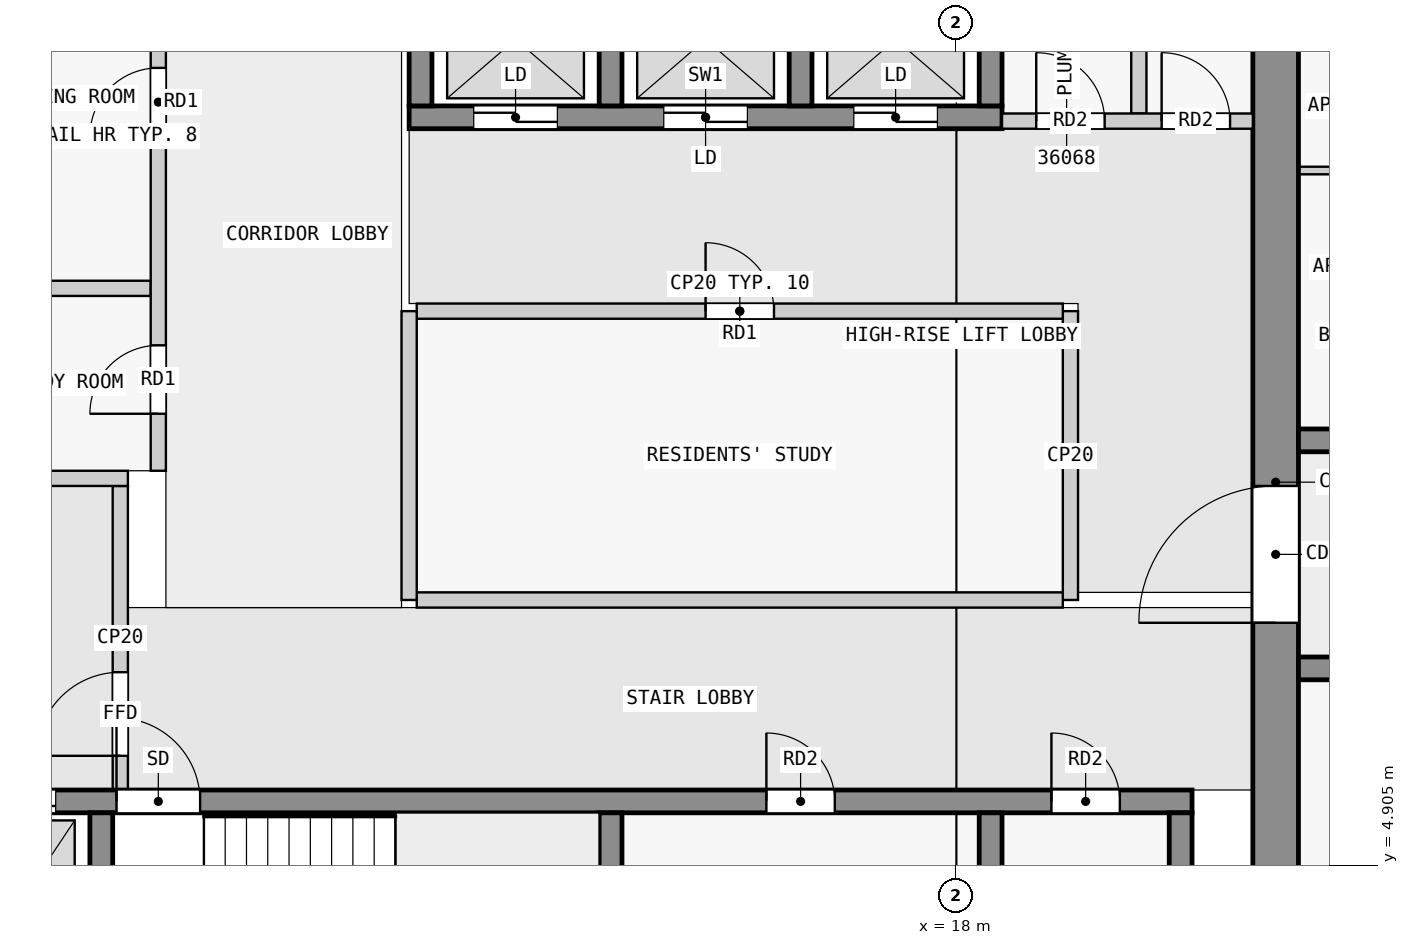
"""IFC4 building model, lengths in metres.
Left out: names, types, materials, properties, quantities, classifications, styles, units other than length and angle.
Written with IfcOpenShell. Run it as: python <this file> out.ifc"""

import sys

from ifc_helpers import new_model, si_unit, direction, frame, frame_2d, origin, place, context, subcontext, project, spatial, rectangle, extrude, element, fill, save


model = new_model("IFC4")
c1 = context("Model", 3, precision=1e-05, world=origin(), true_north=direction((0.0, 1.0)))
c2 = subcontext(c1, "Body", "Model", "MODEL_VIEW")
j1 = project(units=[si_unit("LENGTHUNIT", "METRE"), si_unit("PLANEANGLEUNIT", "RADIAN")], contexts=[c1])
p1 = place(None, origin())
s1 = spatial("IfcSite", under=j1, at=p1, CompositionType="ELEMENT")
p2 = place(p1, origin())
s2 = spatial("IfcBuilding", under=s1, at=p2, CompositionType="ELEMENT")
p3 = place(p2, frame((0.0, 0.0, 142.9)))
s3 = spatial("IfcBuildingStorey", under=s2, at=p3, CompositionType="ELEMENT", Elevation=142.9)
p4 = place(p3, frame((22.2, 2.5, 0.0), z_axis=(0.0, 0.0, 1.0), x_axis=(0.0, 1.0, 0.0)))
e1 = element("IfcWall", 1, at=p4, inside=s3, PredefinedType="SHEAR", context=c2, shape_type="SweptSolid", body=[
    extrude(rectangle(XDim=14.9, YDim=0.6, at=frame_2d((7.45, 0.0))), origin(), (0.0, 0.0, 1.0), 3.25),
])
p5 = place(p4, frame((5.6, 0.0, 0.0)))
e2 = element("IfcOpeningElement", 2, at=p5, cuts=e1, PredefinedType="OPENING", context=c2, shape_type="SweptSolid", body=[
    extrude(rectangle(XDim=1.8, YDim=2.1, at=frame_2d((0.9, 1.05))), frame((0.0, 0.31, 0.0), z_axis=(0.0, -1.0, 0.0), x_axis=(1.0, 0.0, 0.0)), (0.0, 0.0, 1.0), 0.62),
])
for number, where, z_axis, x_axis in (
    (3, (6.75, 2.8, 0.0), (0.0, 0.0, 1.0), (0.0, 1.0, 0.0)),
    (4, (13.45, 2.8, 0.0), (0.0, 0.0, 1.0), (0.0, 1.0, 0.0)),
    (5, (18.45, 2.8, 0.0), (0.0, 0.0, 1.0), (0.0, 1.0, 0.0)),
    (6, (20.95, 2.8, 0.0), (0.0, 0.0, 1.0), (0.0, 1.0, 0.0)),
):
    element("IfcWall", number, at=place(p3, frame(where, z_axis=z_axis, x_axis=x_axis)), inside=s3, PredefinedType="SHEAR", context=c2, shape_type="SweptSolid", body=[
        extrude(rectangle(XDim=2.8, YDim=0.3, at=frame_2d((1.4, 0.0))), origin(), (0.0, 0.0, 1.0), 3.25),
    ])
p6 = place(p3, frame((2.3, 5.75, 0.0), z_axis=(0.0, 0.0, 1.0), x_axis=(1.0, 0.0, 0.0)))
e7 = element("IfcWall", 7, at=p6, inside=s3, PredefinedType="SHEAR", context=c2, shape_type="SweptSolid", body=[
    extrude(rectangle(XDim=18.8, YDim=0.3, at=frame_2d((9.4, 0.0))), origin(), (0.0, 0.0, 1.0), 3.25),
])
p7 = place(p6, frame((4.65, 0.0, 0.0)))
e8 = element("IfcOpeningElement", 8, at=p7, cuts=e7, PredefinedType="OPENING", context=c2, shape_type="SweptSolid", body=[
    extrude(rectangle(XDim=1.1, YDim=2.1, at=frame_2d((0.55, 1.05))), frame((0.0, 0.16, 0.0), z_axis=(0.0, -1.0, 0.0), x_axis=(1.0, 0.0, 0.0)), (0.0, 0.0, 1.0), 0.32),
])
p8 = place(p6, frame((0.45, 0.0, 0.0)))
e9 = element("IfcOpeningElement", 9, at=p8, cuts=e7, PredefinedType="OPENING", context=c2, shape_type="SweptSolid", body=[
    extrude(rectangle(XDim=1.1, YDim=2.1, at=frame_2d((0.55, 1.05))), frame((0.0, 0.16, 0.0), z_axis=(0.0, -1.0, 0.0), x_axis=(1.0, 0.0, 0.0)), (0.0, 0.0, 1.0), 0.32),
])
p9 = place(p6, frame((2.75, 0.0, 0.0)))
e10 = element("IfcOpeningElement", 10, at=p9, cuts=e7, PredefinedType="OPENING", context=c2, shape_type="SweptSolid", body=[
    extrude(rectangle(XDim=1.1, YDim=2.1, at=frame_2d((0.55, 1.05))), frame((0.0, 0.16, 0.0), z_axis=(0.0, -1.0, 0.0), x_axis=(1.0, 0.0, 0.0)), (0.0, 0.0, 1.0), 0.32),
])
p10 = place(p6, frame((13.2, 0.0, 0.0)))
e11 = element("IfcOpeningElement", 11, at=p10, cuts=e7, PredefinedType="OPENING", context=c2, shape_type="SweptSolid", body=[
    extrude(rectangle(XDim=0.9, YDim=2.1, at=frame_2d((0.45, 1.05))), frame((0.0, 0.16, 0.0), z_axis=(0.0, -1.0, 0.0), x_axis=(1.0, 0.0, 0.0)), (0.0, 0.0, 1.0), 0.32),
])
p11 = place(p6, frame((16.95, 0.0, 0.0)))
e12 = element("IfcOpeningElement", 12, at=p11, cuts=e7, PredefinedType="OPENING", context=c2, shape_type="SweptSolid", body=[
    extrude(rectangle(XDim=0.9, YDim=2.1, at=frame_2d((0.45, 1.05))), frame((0.0, 0.16, 0.0), z_axis=(0.0, -1.0, 0.0), x_axis=(1.0, 0.0, 0.0)), (0.0, 0.0, 1.0), 0.32),
])
p12 = place(p3, frame((10.8, 14.75, 0.0), z_axis=(0.0, 0.0, 1.0), x_axis=(1.0, 0.0, 0.0)))
e13 = element("IfcWall", 13, at=p12, inside=s3, PredefinedType="SHEAR", context=c2, shape_type="SweptSolid", body=[
    extrude(rectangle(XDim=7.8, YDim=0.3, at=frame_2d((3.9, 0.0))), origin(), (0.0, 0.0, 1.0), 3.25),
])
p13 = place(p12, frame((0.85, 0.0, 0.0)))
e14 = element("IfcOpeningElement", 14, at=p13, cuts=e13, PredefinedType="OPENING", context=c2, shape_type="SweptSolid", body=[
    extrude(rectangle(XDim=1.1, YDim=2.1, at=frame_2d((0.55, 1.05))), frame((0.0, 0.16, 0.0), z_axis=(0.0, -1.0, 0.0), x_axis=(1.0, 0.0, 0.0)), (0.0, 0.0, 1.0), 0.32),
])
p14 = place(p12, frame((3.35, 0.0, 0.0)))
e15 = element("IfcOpeningElement", 15, at=p14, cuts=e13, PredefinedType="OPENING", context=c2, shape_type="SweptSolid", body=[
    extrude(rectangle(XDim=1.1, YDim=2.1, at=frame_2d((0.55, 1.05))), frame((0.0, 0.16, 0.0), z_axis=(0.0, -1.0, 0.0), x_axis=(1.0, 0.0, 0.0)), (0.0, 0.0, 1.0), 0.32),
])
p15 = place(p12, frame((5.85, 0.0, 0.0)))
e16 = element("IfcOpeningElement", 16, at=p15, cuts=e13, PredefinedType="OPENING", context=c2, shape_type="SweptSolid", body=[
    extrude(rectangle(XDim=1.1, YDim=2.1, at=frame_2d((0.55, 1.05))), frame((0.0, 0.16, 0.0), z_axis=(0.0, -1.0, 0.0), x_axis=(1.0, 0.0, 0.0)), (0.0, 0.0, 1.0), 0.32),
])
for number, where, z_axis, x_axis in (
    (17, (10.95, 14.9, 0.0), (0.0, 0.0, 1.0), (0.0, 1.0, 0.0)),
    (18, (13.45, 14.9, 0.0), (0.0, 0.0, 1.0), (0.0, 1.0, 0.0)),
    (19, (15.95, 14.9, 0.0), (0.0, 0.0, 1.0), (0.0, 1.0, 0.0)),
    (20, (18.45, 14.9, 0.0), (0.0, 0.0, 1.0), (0.0, 1.0, 0.0)),
):
    element("IfcWall", number, at=place(p3, frame(where, z_axis=z_axis, x_axis=x_axis)), inside=s3, PredefinedType="SHEAR", context=c2, shape_type="SweptSolid", body=[
        extrude(rectangle(XDim=2.0, YDim=0.3, at=frame_2d((1.0, 0.0))), origin(), (0.0, 0.0, 1.0), 3.25),
    ])
p16 = place(p3, frame((22.5, 7.5, 0.0), z_axis=(0.0, 0.0, 1.0), x_axis=(1.0, 0.0, 0.0)))
e21 = element("IfcWall", 21, at=p16, inside=s3, PredefinedType="SHEAR", context=c2, shape_type="SweptSolid", body=[
    extrude(rectangle(XDim=22.5, YDim=0.3, at=frame_2d((11.25, 0.0))), origin(), (0.0, 0.0, 1.0), 3.25),
])
p17 = place(p16, frame((1.75, 0.0, 0.0)))
e22 = element("IfcOpeningElement", 22, at=p17, cuts=e21, PredefinedType="OPENING", context=c2, shape_type="SweptSolid", body=[
    extrude(rectangle(XDim=1.0, YDim=2.1, at=frame_2d((0.5, 1.05))), frame((0.0, 0.16, 0.0), z_axis=(0.0, -1.0, 0.0), x_axis=(1.0, 0.0, 0.0)), (0.0, 0.0, 1.0), 0.32),
])
p18 = place(p16, frame((6.25, 0.0, 0.0)))
e23 = element("IfcOpeningElement", 23, at=p18, cuts=e21, PredefinedType="OPENING", context=c2, shape_type="SweptSolid", body=[
    extrude(rectangle(XDim=1.0, YDim=2.1, at=frame_2d((0.5, 1.05))), frame((0.0, 0.16, 0.0), z_axis=(0.0, -1.0, 0.0), x_axis=(1.0, 0.0, 0.0)), (0.0, 0.0, 1.0), 0.32),
])
p19 = place(p16, frame((10.35, 0.0, 0.0)))
e24 = element("IfcOpeningElement", 24, at=p19, cuts=e21, PredefinedType="OPENING", context=c2, shape_type="SweptSolid", body=[
    extrude(rectangle(XDim=1.8, YDim=2.1, at=frame_2d((0.9, 1.05))), frame((0.0, 0.16, 0.0), z_axis=(0.0, -1.0, 0.0), x_axis=(1.0, 0.0, 0.0)), (0.0, 0.0, 1.0), 0.32),
])
p20 = place(p16, frame((16.85, 0.0, 0.0)))
e25 = element("IfcOpeningElement", 25, at=p20, cuts=e21, PredefinedType="OPENING", context=c2, shape_type="SweptSolid", body=[
    extrude(rectangle(XDim=1.0, YDim=2.1, at=frame_2d((0.5, 1.05))), frame((0.0, 0.16, 0.0), z_axis=(0.0, -1.0, 0.0), x_axis=(1.0, 0.0, 0.0)), (0.0, 0.0, 1.0), 0.32),
])
p21 = place(p3, frame((22.5, 10.5, 0.0), z_axis=(0.0, 0.0, 1.0), x_axis=(1.0, 0.0, 0.0)))
e26 = element("IfcWall", 26, at=p21, inside=s3, PredefinedType="SHEAR", context=c2, shape_type="SweptSolid", body=[
    extrude(rectangle(XDim=22.5, YDim=0.3, at=frame_2d((11.25, 0.0))), origin(), (0.0, 0.0, 1.0), 3.25),
])
p22 = place(p21, frame((4.05, 0.0, 0.0)))
e27 = element("IfcOpeningElement", 27, at=p22, cuts=e26, PredefinedType="OPENING", context=c2, shape_type="SweptSolid", body=[
    extrude(rectangle(XDim=1.0, YDim=2.1, at=frame_2d((0.5, 1.05))), frame((0.0, 0.16, 0.0), z_axis=(0.0, -1.0, 0.0), x_axis=(1.0, 0.0, 0.0)), (0.0, 0.0, 1.0), 0.32),
])
p23 = place(p21, frame((10.85, 0.0, 0.0)))
e28 = element("IfcOpeningElement", 28, at=p23, cuts=e26, PredefinedType="OPENING", context=c2, shape_type="SweptSolid", body=[
    extrude(rectangle(XDim=0.9, YDim=2.1, at=frame_2d((0.45, 1.05))), frame((0.0, 0.16, 0.0), z_axis=(0.0, -1.0, 0.0), x_axis=(1.0, 0.0, 0.0)), (0.0, 0.0, 1.0), 0.32),
])
p24 = place(p21, frame((15.25, 0.0, 0.0)))
e29 = element("IfcOpeningElement", 29, at=p24, cuts=e26, PredefinedType="OPENING", context=c2, shape_type="SweptSolid", body=[
    extrude(rectangle(XDim=1.0, YDim=2.1, at=frame_2d((0.5, 1.05))), frame((0.0, 0.16, 0.0), z_axis=(0.0, -1.0, 0.0), x_axis=(1.0, 0.0, 0.0)), (0.0, 0.0, 1.0), 0.32),
])
p25 = place(p21, frame((18.75, 0.0, 0.0)))
e30 = element("IfcOpeningElement", 30, at=p25, cuts=e26, PredefinedType="OPENING", context=c2, shape_type="SweptSolid", body=[
    extrude(rectangle(XDim=0.9, YDim=2.1, at=frame_2d((0.45, 1.05))), frame((0.0, 0.16, 0.0), z_axis=(0.0, -1.0, 0.0), x_axis=(1.0, 0.0, 0.0)), (0.0, 0.0, 1.0), 0.32),
])
p26 = place(p21, frame((20.95, 0.0, 0.0)))
e31 = element("IfcOpeningElement", 31, at=p26, cuts=e26, PredefinedType="OPENING", context=c2, shape_type="SweptSolid", body=[
    extrude(rectangle(XDim=1.0, YDim=2.1, at=frame_2d((0.5, 1.05))), frame((0.0, 0.16, 0.0), z_axis=(0.0, -1.0, 0.0), x_axis=(1.0, 0.0, 0.0)), (0.0, 0.0, 1.0), 0.32),
])
p27 = place(p3, frame((7.0, 5.9, 0.0), z_axis=(0.0, 0.0, 1.0), x_axis=(0.0, 1.0, 0.0)))
e32 = element("IfcWall", 32, at=p27, inside=s3, PredefinedType="PARTITIONING", context=c2, shape_type="SweptSolid", body=[
    extrude(rectangle(XDim=4.0, YDim=0.2, at=frame_2d((2.0, 0.0))), origin(), (0.0, 0.0, 1.0), 3.25),
])
p28 = place(p27, frame((0.45, 0.0, 0.0)))
e33 = element("IfcOpeningElement", 33, at=p28, cuts=e32, PredefinedType="OPENING", context=c2, shape_type="SweptSolid", body=[
    extrude(rectangle(XDim=1.1, YDim=2.1, at=frame_2d((0.55, 1.05))), frame((0.0, 0.11, 0.0), z_axis=(0.0, -1.0, 0.0), x_axis=(1.0, 0.0, 0.0)), (0.0, 0.0, 1.0), 0.22),
])
p29 = place(p3, frame((5.15, 10.0, 0.0), z_axis=(0.0, 0.0, 1.0), x_axis=(1.0, 0.0, 0.0)))
e34 = element("IfcWall", 34, at=p29, inside=s3, PredefinedType="PARTITIONING", context=c2, shape_type="SweptSolid", body=[
    extrude(rectangle(XDim=1.95, YDim=0.2, at=frame_2d((0.975, 0.0))), origin(), (0.0, 0.0, 1.0), 3.25),
])
p30 = place(p3, frame((10.8, 8.4, 0.0), z_axis=(0.0, 0.0, 1.0), x_axis=(0.0, 1.0, 0.0)))
e35 = element("IfcWall", 35, at=p30, inside=s3, PredefinedType="PARTITIONING", context=c2, shape_type="SweptSolid", body=[
    extrude(rectangle(XDim=3.8, YDim=0.2, at=frame_2d((1.9, 0.0))), origin(), (0.0, 0.0, 1.0), 3.25),
])
p31 = place(p3, frame((10.9, 8.4, 0.0), z_axis=(0.0, 0.0, 1.0), x_axis=(1.0, 0.0, 0.0)))
e36 = element("IfcWall", 36, at=p31, inside=s3, PredefinedType="PARTITIONING", context=c2, shape_type="SweptSolid", body=[
    extrude(rectangle(XDim=8.5, YDim=0.2, at=frame_2d((4.25, 0.0))), origin(), (0.0, 0.0, 1.0), 3.25),
])
p32 = place(p3, frame((19.5, 8.4, 0.0), z_axis=(0.0, 0.0, 1.0), x_axis=(0.0, 1.0, 0.0)))
e37 = element("IfcWall", 37, at=p32, inside=s3, PredefinedType="PARTITIONING", context=c2, shape_type="SweptSolid", body=[
    extrude(rectangle(XDim=3.8, YDim=0.2, at=frame_2d((1.9, 0.0))), origin(), (0.0, 0.0, 1.0), 3.25),
])
p33 = place(p3, frame((10.9, 12.2, 0.0), z_axis=(0.0, 0.0, 1.0), x_axis=(1.0, 0.0, 0.0)))
e38 = element("IfcWall", 38, at=p33, inside=s3, PredefinedType="PARTITIONING", context=c2, shape_type="SweptSolid", body=[
    extrude(rectangle(XDim=8.5, YDim=0.2, at=frame_2d((4.25, 0.0))), origin(), (0.0, 0.0, 1.0), 3.25),
])
p34 = place(p33, frame((3.8, 0.0, 0.0)))
e39 = element("IfcOpeningElement", 39, at=p34, cuts=e38, PredefinedType="OPENING", context=c2, shape_type="SweptSolid", body=[
    extrude(rectangle(XDim=0.9, YDim=2.1, at=frame_2d((0.45, 1.05))), frame((0.0, 0.11, 0.0), z_axis=(0.0, -1.0, 0.0), x_axis=(1.0, 0.0, 0.0)), (0.0, 0.0, 1.0), 0.22),
])
p35 = place(p3, frame((7.5, 10.1, 0.0), z_axis=(0.0, 0.0, 1.0), x_axis=(0.0, 1.0, 0.0)))
e40 = element("IfcWall", 40, at=p35, inside=s3, PredefinedType="PARTITIONING", context=c2, shape_type="SweptSolid", body=[
    extrude(rectangle(XDim=7.3, YDim=0.2, at=frame_2d((3.65, 0.0))), origin(), (0.0, 0.0, 1.0), 3.25),
])
p36 = place(p35, frame((0.75, 0.0, 0.0)))
e41 = element("IfcOpeningElement", 41, at=p36, cuts=e40, PredefinedType="OPENING", context=c2, shape_type="SweptSolid", body=[
    extrude(rectangle(XDim=0.9, YDim=2.1, at=frame_2d((0.45, 1.05))), frame((0.0, 0.11, 0.0), z_axis=(0.0, -1.0, 0.0), x_axis=(1.0, 0.0, 0.0)), (0.0, 0.0, 1.0), 0.22),
])
p37 = place(p35, frame((4.4, 0.0, 0.0)))
e42 = element("IfcOpeningElement", 42, at=p37, cuts=e40, PredefinedType="OPENING", context=c2, shape_type="SweptSolid", body=[
    extrude(rectangle(XDim=0.9, YDim=2.1, at=frame_2d((0.45, 1.05))), frame((0.0, 0.11, 0.0), z_axis=(0.0, -1.0, 0.0), x_axis=(1.0, 0.0, 0.0)), (0.0, 0.0, 1.0), 0.22),
])
p38 = place(p3, frame((5.15, 12.5, 0.0), z_axis=(0.0, 0.0, 1.0), x_axis=(1.0, 0.0, 0.0)))
e43 = element("IfcWall", 43, at=p38, inside=s3, PredefinedType="PARTITIONING", context=c2, shape_type="SweptSolid", body=[
    extrude(rectangle(XDim=2.25, YDim=0.2, at=frame_2d((1.125, 0.0))), origin(), (0.0, 0.0, 1.0), 3.25),
])
p39 = place(p3, frame((18.6, 14.7, 0.0), z_axis=(0.0, 0.0, 1.0), x_axis=(1.0, 0.0, 0.0)))
e44 = element("IfcWall", 44, at=p39, inside=s3, PredefinedType="PARTITIONING", context=c2, shape_type="SweptSolid", body=[
    extrude(rectangle(XDim=3.3, YDim=0.2, at=frame_2d((1.65, 0.0))), origin(), (0.0, 0.0, 1.0), 3.25),
])
p40 = place(p39, frame((0.45, 0.0, 0.0)))
e45 = element("IfcOpeningElement", 45, at=p40, cuts=e44, PredefinedType="OPENING", context=c2, shape_type="SweptSolid", body=[
    extrude(rectangle(XDim=0.9, YDim=2.1, at=frame_2d((0.45, 1.05))), frame((0.0, 0.11, 0.0), z_axis=(0.0, -1.0, 0.0), x_axis=(1.0, 0.0, 0.0)), (0.0, 0.0, 1.0), 0.22),
])
p41 = place(p39, frame((2.1, 0.0, 0.0)))
e46 = element("IfcOpeningElement", 46, at=p41, cuts=e44, PredefinedType="OPENING", context=c2, shape_type="SweptSolid", body=[
    extrude(rectangle(XDim=0.9, YDim=2.1, at=frame_2d((0.45, 1.05))), frame((0.0, 0.11, 0.0), z_axis=(0.0, -1.0, 0.0), x_axis=(1.0, 0.0, 0.0)), (0.0, 0.0, 1.0), 0.22),
])
p42 = place(p3, frame((20.4, 14.8, 0.0), z_axis=(0.0, 0.0, 1.0), x_axis=(0.0, 1.0, 0.0)))
e47 = element("IfcWall", 47, at=p42, inside=s3, PredefinedType="PARTITIONING", context=c2, shape_type="SweptSolid", body=[
    extrude(rectangle(XDim=2.6, YDim=0.2, at=frame_2d((1.3, 0.0))), origin(), (0.0, 0.0, 1.0), 3.25),
])
p43 = place(p3, frame((24.25, 14.05, 0.0), z_axis=(0.0, 0.0, 1.0), x_axis=(-1.0, 0.0, 0.0)))
e48 = element("IfcWall", 48, at=p43, inside=s3, PredefinedType="PARTITIONING", context=c2, shape_type="SweptSolid", body=[
    extrude(rectangle(XDim=1.75, YDim=0.1, at=frame_2d((0.875, 0.0))), origin(), (0.0, 0.0, 1.0), 3.25),
])
p44 = place(p28, origin())
e49 = element("IfcDoor", 49, at=p44, inside=s3, OperationType="SINGLE_SWING_LEFT", PredefinedType="DOOR", context=c2, shape_type="SweptSolid", body=[
    extrude(rectangle(XDim=1.1, YDim=2.1, at=frame_2d((0.55, 1.05))), frame((0.0, 0.025, 0.0), z_axis=(0.0, -1.0, 0.0), x_axis=(1.0, 0.0, 0.0)), (0.0, 0.0, 1.0), 0.05),
])
fill(e33, e49)
p45 = place(p34, origin())
e50 = element("IfcDoor", 50, at=p45, inside=s3, OperationType="SINGLE_SWING_LEFT", PredefinedType="DOOR", context=c2, shape_type="SweptSolid", body=[
    extrude(rectangle(XDim=0.9, YDim=2.1, at=frame_2d((0.45, 1.05))), frame((0.0, 0.025, 0.0), z_axis=(0.0, -1.0, 0.0), x_axis=(1.0, 0.0, 0.0)), (0.0, 0.0, 1.0), 0.05),
])
fill(e39, e50)
p46 = place(p7, origin())
e51 = element("IfcDoor", 51, at=p46, inside=s3, OperationType="SINGLE_SWING_LEFT", PredefinedType="DOOR", context=c2, shape_type="SweptSolid", body=[
    extrude(rectangle(XDim=1.1, YDim=2.1, at=frame_2d((0.55, 1.05))), frame((0.0, 0.025, 0.0), z_axis=(0.0, -1.0, 0.0), x_axis=(1.0, 0.0, 0.0)), (0.0, 0.0, 1.0), 0.05),
])
fill(e8, e51)
p47 = place(p9, origin())
e52 = element("IfcDoor", 52, at=p47, inside=s3, OperationType="DOUBLE_DOOR_SLIDING", PredefinedType="DOOR", context=c2, shape_type="SweptSolid", body=[
    extrude(rectangle(XDim=1.1, YDim=2.1, at=frame_2d((0.55, 1.05))), frame((0.0, 0.025, 0.0), z_axis=(0.0, -1.0, 0.0), x_axis=(1.0, 0.0, 0.0)), (0.0, 0.0, 1.0), 0.05),
])
fill(e10, e52)
p48 = place(p13, origin())
e53 = element("IfcDoor", 53, at=p48, inside=s3, OperationType="DOUBLE_DOOR_SLIDING", PredefinedType="DOOR", context=c2, shape_type="SweptSolid", body=[
    extrude(rectangle(XDim=1.1, YDim=2.1, at=frame_2d((0.55, 1.05))), frame((0.0, 0.025, 0.0), z_axis=(0.0, -1.0, 0.0), x_axis=(1.0, 0.0, 0.0)), (0.0, 0.0, 1.0), 0.05),
])
fill(e14, e53)
p49 = place(p14, origin())
e54 = element("IfcDoor", 54, at=p49, inside=s3, OperationType="DOUBLE_DOOR_SLIDING", PredefinedType="DOOR", context=c2, shape_type="SweptSolid", body=[
    extrude(rectangle(XDim=1.1, YDim=2.1, at=frame_2d((0.55, 1.05))), frame((0.0, 0.025, 0.0), z_axis=(0.0, -1.0, 0.0), x_axis=(1.0, 0.0, 0.0)), (0.0, 0.0, 1.0), 0.05),
])
fill(e15, e54)
p50 = place(p15, origin())
e55 = element("IfcDoor", 55, at=p50, inside=s3, OperationType="DOUBLE_DOOR_SLIDING", PredefinedType="DOOR", context=c2, shape_type="SweptSolid", body=[
    extrude(rectangle(XDim=1.1, YDim=2.1, at=frame_2d((0.55, 1.05))), frame((0.0, 0.025, 0.0), z_axis=(0.0, -1.0, 0.0), x_axis=(1.0, 0.0, 0.0)), (0.0, 0.0, 1.0), 0.05),
])
fill(e16, e55)
p51 = place(p5, origin())
e56 = element("IfcDoor", 56, at=p51, inside=s3, OperationType="DOUBLE_DOOR_SINGLE_SWING", PredefinedType="DOOR", context=c2, shape_type="SweptSolid", body=[
    extrude(rectangle(XDim=1.8, YDim=2.1, at=frame_2d((0.9, 1.05))), frame((0.0, 0.025, 0.0), z_axis=(0.0, -1.0, 0.0), x_axis=(1.0, 0.0, 0.0)), (0.0, 0.0, 1.0), 0.05),
])
fill(e2, e56)
p52 = place(p36, origin())
e57 = element("IfcDoor", 57, at=p52, inside=s3, OperationType="SINGLE_SWING_RIGHT", PredefinedType="DOOR", context=c2, shape_type="SweptSolid", body=[
    extrude(rectangle(XDim=0.9, YDim=2.1, at=frame_2d((0.45, 1.05))), frame((0.0, 0.025, 0.0), z_axis=(0.0, -1.0, 0.0), x_axis=(1.0, 0.0, 0.0)), (0.0, 0.0, 1.0), 0.05),
])
fill(e41, e57)
p53 = place(p37, origin())
e58 = element("IfcDoor", 58, at=p53, inside=s3, OperationType="SINGLE_SWING_RIGHT", PredefinedType="DOOR", context=c2, shape_type="SweptSolid", body=[
    extrude(rectangle(XDim=0.9, YDim=2.1, at=frame_2d((0.45, 1.05))), frame((0.0, 0.025, 0.0), z_axis=(0.0, -1.0, 0.0), x_axis=(1.0, 0.0, 0.0)), (0.0, 0.0, 1.0), 0.05),
])
fill(e42, e58)
p54 = place(p40, origin())
e59 = element("IfcDoor", 59, at=p54, inside=s3, OperationType="SINGLE_SWING_LEFT", PredefinedType="DOOR", context=c2, shape_type="SweptSolid", body=[
    extrude(rectangle(XDim=0.9, YDim=2.1, at=frame_2d((0.45, 1.05))), frame((0.0, 0.025, 0.0), z_axis=(0.0, -1.0, 0.0), x_axis=(1.0, 0.0, 0.0)), (0.0, 0.0, 1.0), 0.05),
])
fill(e45, e59)
p55 = place(p41, origin())
e60 = element("IfcDoor", 60, at=p55, inside=s3, OperationType="SINGLE_SWING_LEFT", PredefinedType="DOOR", context=c2, shape_type="SweptSolid", body=[
    extrude(rectangle(XDim=0.9, YDim=2.1, at=frame_2d((0.45, 1.05))), frame((0.0, 0.025, 0.0), z_axis=(0.0, -1.0, 0.0), x_axis=(1.0, 0.0, 0.0)), (0.0, 0.0, 1.0), 0.05),
])
fill(e46, e60)
p56 = place(p10, origin())
e61 = element("IfcDoor", 61, at=p56, inside=s3, OperationType="SINGLE_SWING_LEFT", PredefinedType="DOOR", context=c2, shape_type="SweptSolid", body=[
    extrude(rectangle(XDim=0.9, YDim=2.1, at=frame_2d((0.45, 1.05))), frame((0.0, 0.025, 0.0), z_axis=(0.0, -1.0, 0.0), x_axis=(1.0, 0.0, 0.0)), (0.0, 0.0, 1.0), 0.05),
])
fill(e11, e61)
p57 = place(p11, origin())
e62 = element("IfcDoor", 62, at=p57, inside=s3, OperationType="SINGLE_SWING_LEFT", PredefinedType="DOOR", context=c2, shape_type="SweptSolid", body=[
    extrude(rectangle(XDim=0.9, YDim=2.1, at=frame_2d((0.45, 1.05))), frame((0.0, 0.025, 0.0), z_axis=(0.0, -1.0, 0.0), x_axis=(1.0, 0.0, 0.0)), (0.0, 0.0, 1.0), 0.05),
])
fill(e12, e62)
save(model, sys.argv[1])
